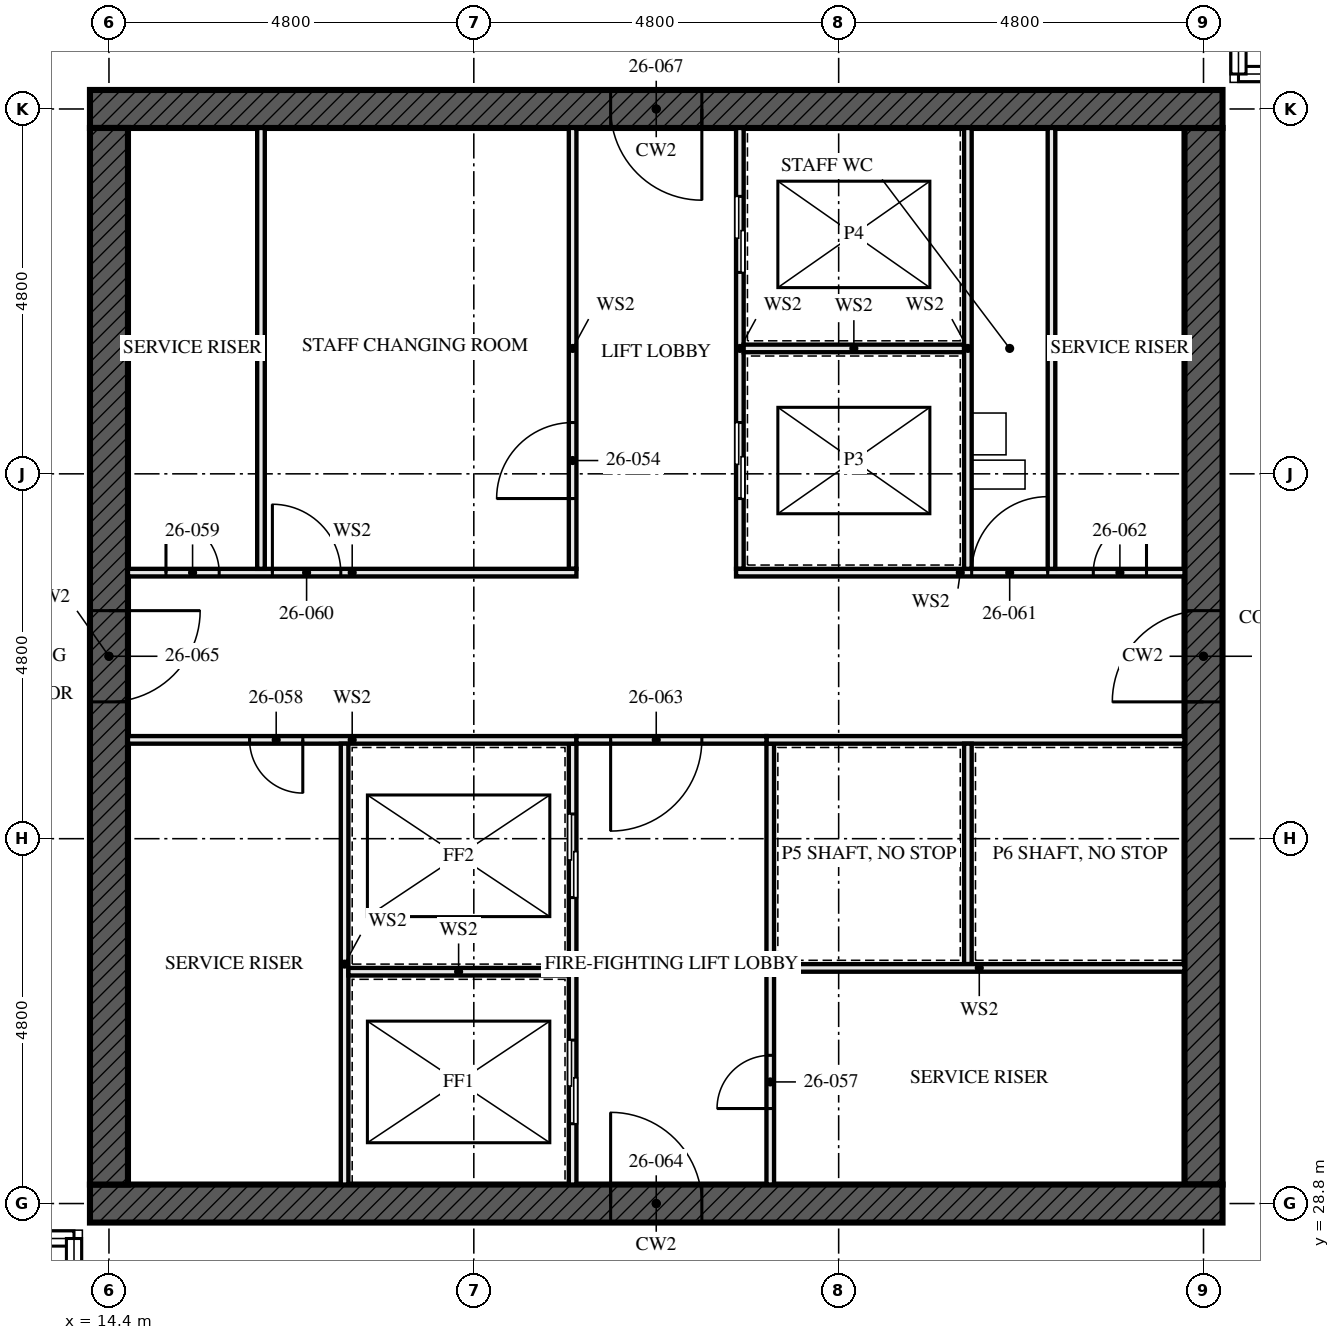
"""IFC4 building model, lengths in metres.
Left out: names, types, materials, properties, quantities, classifications, styles, units other than length and angle.
Written with IfcOpenShell. Run it as: python <this file> out.ifc"""

import sys

from ifc_helpers import new_model, si_unit, direction, frame, frame_2d, origin, place, context, subcontext, project, spatial, rectangle, extrude, element, fill, save


model = new_model("IFC4")
c1 = context("Model", 3, precision=1e-05, world=origin(), true_north=direction((0.0, 1.0)))
c2 = subcontext(c1, "Body", "Model", "MODEL_VIEW")
j1 = project(units=[si_unit("LENGTHUNIT", "METRE"), si_unit("PLANEANGLEUNIT", "RADIAN")], contexts=[c1])
p1 = place(None, origin())
s1 = spatial("IfcSite", under=j1, at=p1, CompositionType="ELEMENT")
p2 = place(p1, origin())
s2 = spatial("IfcBuilding", under=s1, at=p2, CompositionType="ELEMENT")
p3 = place(p2, frame((0.0, 0.0, 98.0)))
s3 = spatial("IfcBuildingStorey", under=s2, at=p3, CompositionType="ELEMENT", Elevation=98.0)
p4 = place(p3, frame((14.15, 28.8, -0.17), z_axis=(0.0, 0.0, 1.0), x_axis=(1.0, 0.0, 0.0)))
e1 = element("IfcWall", 1, at=p4, inside=s3, PredefinedType="SHEAR", context=c2, shape_type="SweptSolid", body=[
    extrude(rectangle(XDim=14.9, YDim=0.5, at=frame_2d((7.45, 0.0))), origin(), (0.0, 0.0, 1.0), 3.5),
])
p5 = place(p4, frame((6.85, 0.0, 0.17)))
e2 = element("IfcOpeningElement", 2, at=p5, cuts=e1, PredefinedType="OPENING", context=c2, shape_type="SweptSolid", body=[
    extrude(rectangle(XDim=1.2, YDim=2.1, at=frame_2d((0.6, 1.05))), frame((0.0, 0.26, 0.0), z_axis=(0.0, -1.0, 0.0), x_axis=(1.0, 0.0, 0.0)), (0.0, 0.0, 1.0), 0.521),
])
p6 = place(p3, frame((29.05, 43.2, -0.17), z_axis=(0.0, 0.0, 1.0), x_axis=(-1.0, 0.0, 0.0)))
e3 = element("IfcWall", 3, at=p6, inside=s3, PredefinedType="SHEAR", context=c2, shape_type="SweptSolid", body=[
    extrude(rectangle(XDim=14.9, YDim=0.5, at=frame_2d((7.45, 0.0))), origin(), (0.0, 0.0, 1.0), 3.5),
])
p7 = place(p6, frame((6.85, 0.0, 0.17)))
e4 = element("IfcOpeningElement", 4, at=p7, cuts=e3, PredefinedType="OPENING", context=c2, shape_type="SweptSolid", body=[
    extrude(rectangle(XDim=1.2, YDim=2.1, at=frame_2d((0.6, 1.05))), frame((0.0, 0.26, 0.0), z_axis=(0.0, -1.0, 0.0), x_axis=(1.0, 0.0, 0.0)), (0.0, 0.0, 1.0), 0.521),
])
p8 = place(p3, frame((14.4, 42.95, -0.17), z_axis=(0.0, 0.0, 1.0), x_axis=(0.0, -1.0, 0.0)))
e5 = element("IfcWall", 5, at=p8, inside=s3, PredefinedType="SHEAR", context=c2, shape_type="SweptSolid", body=[
    extrude(rectangle(XDim=13.9, YDim=0.5, at=frame_2d((6.95, 0.0))), origin(), (0.0, 0.0, 1.0), 3.5),
])
p9 = place(p8, frame((6.35, 0.0, 0.17)))
e6 = element("IfcOpeningElement", 6, at=p9, cuts=e5, PredefinedType="OPENING", context=c2, shape_type="SweptSolid", body=[
    extrude(rectangle(XDim=1.2, YDim=2.1, at=frame_2d((0.6, 1.05))), frame((0.0, 0.26, 0.0), z_axis=(0.0, -1.0, 0.0), x_axis=(1.0, 0.0, 0.0)), (0.0, 0.0, 1.0), 0.521),
])
p10 = place(p3, frame((28.8, 29.05, -0.17), z_axis=(0.0, 0.0, 1.0), x_axis=(0.0, 1.0, 0.0)))
e7 = element("IfcWall", 7, at=p10, inside=s3, PredefinedType="SHEAR", context=c2, shape_type="SweptSolid", body=[
    extrude(rectangle(XDim=13.9, YDim=0.5, at=frame_2d((6.95, 0.0))), origin(), (0.0, 0.0, 1.0), 3.5),
])
p11 = place(p10, frame((6.35, 0.0, 0.17)))
e8 = element("IfcOpeningElement", 8, at=p11, cuts=e7, PredefinedType="OPENING", context=c2, shape_type="SweptSolid", body=[
    extrude(rectangle(XDim=1.2, YDim=2.1, at=frame_2d((0.6, 1.05))), frame((0.0, 0.26, 0.0), z_axis=(0.0, -1.0, 0.0), x_axis=(1.0, 0.0, 0.0)), (0.0, 0.0, 1.0), 0.521),
])
for number, where, z_axis, x_axis in (
    (9, (16.4, 37.15, 0.0), (0.0, 0.0, 1.0), (0.0, 1.0, 0.0)),
    (10, (26.8, 37.15, 0.0), (0.0, 0.0, 1.0), (0.0, 1.0, 0.0)),
):
    element("IfcWall", number, at=place(p3, frame(where, z_axis=z_axis, x_axis=x_axis)), inside=s3, PredefinedType="SOLIDWALL", context=c2, shape_type="SweptSolid", body=[
        extrude(rectangle(XDim=5.8, YDim=0.1, at=frame_2d((2.9, 0.0))), origin(), (0.0, 0.0, 1.0), 3.33),
    ])
p12 = place(p3, frame((20.5, 29.05, 0.0), z_axis=(0.0, 0.0, 1.0), x_axis=(0.0, 1.0, 0.0)))
e11 = element("IfcWall", 11, at=p12, inside=s3, PredefinedType="SOLIDWALL", context=c2, shape_type="SweptSolid", body=[
    extrude(rectangle(XDim=5.8, YDim=0.1, at=frame_2d((2.9, 0.0))), origin(), (0.0, 0.0, 1.0), 3.33),
])
p13 = place(p12, frame((0.8, 0.0, 0.0)))
e12 = element("IfcOpeningElement", 12, at=p13, cuts=e11, PredefinedType="OPENING", context=c2, shape_type="SweptSolid", body=[
    extrude(rectangle(XDim=1.1, YDim=2.3, at=frame_2d((0.55, 1.15))), frame((0.0, 0.061, 0.0), z_axis=(0.0, -1.0, 0.0), x_axis=(1.0, 0.0, 0.0)), (0.0, 0.0, 1.0), 0.121),
])
p14 = place(p12, frame((3.775, 0.0, 0.0)))
e13 = element("IfcOpeningElement", 13, at=p14, cuts=e11, PredefinedType="OPENING", context=c2, shape_type="SweptSolid", body=[
    extrude(rectangle(XDim=1.1, YDim=2.3, at=frame_2d((0.55, 1.15))), frame((0.0, 0.061, 0.0), z_axis=(0.0, -1.0, 0.0), x_axis=(1.0, 0.0, 0.0)), (0.0, 0.0, 1.0), 0.121),
])
p15 = place(p3, frame((20.5, 37.15, 0.0), z_axis=(0.0, 0.0, 1.0), x_axis=(0.0, 1.0, 0.0)))
e14 = element("IfcWall", 14, at=p15, inside=s3, PredefinedType="SOLIDWALL", context=c2, shape_type="SweptSolid", body=[
    extrude(rectangle(XDim=5.8, YDim=0.1, at=frame_2d((2.9, 0.0))), origin(), (0.0, 0.0, 1.0), 3.33),
])
p16 = place(p15, frame((0.925, 0.0, 0.0)))
e15 = element("IfcOpeningElement", 15, at=p16, cuts=e14, PredefinedType="OPENING", context=c2, shape_type="SweptSolid", body=[
    extrude(rectangle(XDim=1.0, YDim=2.1, at=frame_2d((0.5, 1.05))), frame((0.0, 0.061, 0.0), z_axis=(0.0, -1.0, 0.0), x_axis=(1.0, 0.0, 0.0)), (0.0, 0.0, 1.0), 0.121),
])
p17 = place(p3, frame((22.7, 37.15, 0.0), z_axis=(0.0, 0.0, 1.0), x_axis=(0.0, 1.0, 0.0)))
e16 = element("IfcWall", 16, at=p17, inside=s3, PredefinedType="SOLIDWALL", context=c2, shape_type="SweptSolid", body=[
    extrude(rectangle(XDim=5.8, YDim=0.1, at=frame_2d((2.9, 0.0))), origin(), (0.0, 0.0, 1.0), 3.33),
])
p18 = place(p17, frame((0.925, 0.0, 0.0)))
e17 = element("IfcOpeningElement", 17, at=p18, cuts=e16, PredefinedType="OPENING", context=c2, shape_type="SweptSolid", body=[
    extrude(rectangle(XDim=1.0, YDim=2.1, at=frame_2d((0.5, 1.05))), frame((0.0, 0.061, 0.0), z_axis=(0.0, -1.0, 0.0), x_axis=(1.0, 0.0, 0.0)), (0.0, 0.0, 1.0), 0.121),
])
p19 = place(p17, frame((3.9, 0.0, 0.0)))
e18 = element("IfcOpeningElement", 18, at=p19, cuts=e16, PredefinedType="OPENING", context=c2, shape_type="SweptSolid", body=[
    extrude(rectangle(XDim=1.0, YDim=2.1, at=frame_2d((0.5, 1.05))), frame((0.0, 0.061, 0.0), z_axis=(0.0, -1.0, 0.0), x_axis=(1.0, 0.0, 0.0)), (0.0, 0.0, 1.0), 0.121),
])
p20 = place(p3, frame((23.1, 29.05, 0.0), z_axis=(0.0, 0.0, 1.0), x_axis=(0.0, 1.0, 0.0)))
e19 = element("IfcWall", 19, at=p20, inside=s3, PredefinedType="SOLIDWALL", context=c2, shape_type="SweptSolid", body=[
    extrude(rectangle(XDim=5.8, YDim=0.1, at=frame_2d((2.9, 0.0))), origin(), (0.0, 0.0, 1.0), 3.33),
])
p21 = place(p20, frame((1.0, 0.0, 0.0)))
e20 = element("IfcOpeningElement", 20, at=p21, cuts=e19, PredefinedType="OPENING", context=c2, shape_type="SweptSolid", body=[
    extrude(rectangle(XDim=0.7, YDim=2.1, at=frame_2d((0.35, 1.05))), frame((0.0, 0.061, 0.0), z_axis=(0.0, -1.0, 0.0), x_axis=(1.0, 0.0, 0.0)), (0.0, 0.0, 1.0), 0.121),
])
p22 = place(p3, frame((14.65, 34.9, 0.0), z_axis=(0.0, 0.0, 1.0), x_axis=(1.0, 0.0, 0.0)))
e21 = element("IfcWall", 21, at=p22, inside=s3, PredefinedType="SOLIDWALL", context=c2, shape_type="SweptSolid", body=[
    extrude(rectangle(XDim=5.9, YDim=0.1, at=frame_2d((2.95, 0.0))), origin(), (0.0, 0.0, 1.0), 3.33),
])
p23 = place(p22, frame((1.6, 0.0, 0.0)))
e22 = element("IfcOpeningElement", 22, at=p23, cuts=e21, PredefinedType="OPENING", context=c2, shape_type="SweptSolid", body=[
    extrude(rectangle(XDim=0.7, YDim=2.1, at=frame_2d((0.35, 1.05))), frame((0.0, 0.061, 0.0), z_axis=(0.0, -1.0, 0.0), x_axis=(1.0, 0.0, 0.0)), (0.0, 0.0, 1.0), 0.121),
])
p24 = place(p3, frame((23.05, 34.9, 0.0), z_axis=(0.0, 0.0, 1.0), x_axis=(1.0, 0.0, 0.0)))
e23 = element("IfcWall", 23, at=p24, inside=s3, PredefinedType="SOLIDWALL", context=c2, shape_type="SweptSolid", body=[
    extrude(rectangle(XDim=5.5, YDim=0.1, at=frame_2d((2.75, 0.0))), origin(), (0.0, 0.0, 1.0), 3.33),
])
p25 = place(p3, frame((14.65, 37.1, 0.0), z_axis=(0.0, 0.0, 1.0), x_axis=(1.0, 0.0, 0.0)))
e24 = element("IfcWall", 24, at=p25, inside=s3, PredefinedType="SOLIDWALL", context=c2, shape_type="SweptSolid", body=[
    extrude(rectangle(XDim=5.9, YDim=0.1, at=frame_2d((2.95, 0.0))), origin(), (0.0, 0.0, 1.0), 3.33),
])
p26 = place(p25, frame((0.5, 0.0, 0.0)))
e25 = element("IfcOpeningElement", 25, at=p26, cuts=e24, PredefinedType="OPENING", context=c2, shape_type="SweptSolid", body=[
    extrude(rectangle(XDim=0.7, YDim=2.1, at=frame_2d((0.35, 1.05))), frame((0.0, 0.061, 0.0), z_axis=(0.0, -1.0, 0.0), x_axis=(1.0, 0.0, 0.0)), (0.0, 0.0, 1.0), 0.121),
])
p27 = place(p25, frame((1.9, 0.0, 0.0)))
e26 = element("IfcOpeningElement", 26, at=p27, cuts=e24, PredefinedType="OPENING", context=c2, shape_type="SweptSolid", body=[
    extrude(rectangle(XDim=0.9, YDim=2.1, at=frame_2d((0.45, 1.05))), frame((0.0, 0.061, 0.0), z_axis=(0.0, -1.0, 0.0), x_axis=(1.0, 0.0, 0.0)), (0.0, 0.0, 1.0), 0.121),
])
p28 = place(p3, frame((22.65, 37.1, 0.0), z_axis=(0.0, 0.0, 1.0), x_axis=(1.0, 0.0, 0.0)))
e27 = element("IfcWall", 27, at=p28, inside=s3, PredefinedType="SOLIDWALL", context=c2, shape_type="SweptSolid", body=[
    extrude(rectangle(XDim=5.9, YDim=0.1, at=frame_2d((2.95, 0.0))), origin(), (0.0, 0.0, 1.0), 3.33),
])
p29 = place(p28, frame((3.1, 0.0, 0.0)))
e28 = element("IfcOpeningElement", 28, at=p29, cuts=e27, PredefinedType="OPENING", context=c2, shape_type="SweptSolid", body=[
    extrude(rectangle(XDim=1.0, YDim=2.1, at=frame_2d((0.5, 1.05))), frame((0.0, 0.061, 0.0), z_axis=(0.0, -1.0, 0.0), x_axis=(1.0, 0.0, 0.0)), (0.0, 0.0, 1.0), 0.121),
])
p30 = place(p28, frame((4.7, 0.0, 0.0)))
e29 = element("IfcOpeningElement", 29, at=p30, cuts=e27, PredefinedType="OPENING", context=c2, shape_type="SweptSolid", body=[
    extrude(rectangle(XDim=0.7, YDim=2.1, at=frame_2d((0.35, 1.05))), frame((0.0, 0.061, 0.0), z_axis=(0.0, -1.0, 0.0), x_axis=(1.0, 0.0, 0.0)), (0.0, 0.0, 1.0), 0.121),
])
p31 = place(p3, frame((20.55, 34.9, 0.0), z_axis=(0.0, 0.0, 1.0), x_axis=(1.0, 0.0, 0.0)))
e30 = element("IfcWall", 30, at=p31, inside=s3, PredefinedType="SOLIDWALL", context=c2, shape_type="SweptSolid", body=[
    extrude(rectangle(XDim=2.5, YDim=0.1, at=frame_2d((1.25, 0.0))), origin(), (0.0, 0.0, 1.0), 3.33),
])
p32 = place(p31, frame((0.45, 0.0, 0.0)))
e31 = element("IfcOpeningElement", 31, at=p32, cuts=e30, PredefinedType="OPENING", context=c2, shape_type="SweptSolid", body=[
    extrude(rectangle(XDim=1.2, YDim=2.1, at=frame_2d((0.6, 1.05))), frame((0.0, 0.061, 0.0), z_axis=(0.0, -1.0, 0.0), x_axis=(1.0, 0.0, 0.0)), (0.0, 0.0, 1.0), 0.121),
])
p33 = place(p3, frame((17.5, 29.05, 0.0), z_axis=(0.0, 0.0, 1.0), x_axis=(0.0, 1.0, 0.0)))
e32 = element("IfcWall", 32, at=p33, inside=s3, PredefinedType="SOLIDWALL", context=c2, shape_type="SweptSolid", body=[
    extrude(rectangle(XDim=5.8, YDim=0.1, at=frame_2d((2.9, 0.0))), origin(), (0.0, 0.0, 1.0), 3.33),
])
for number, where, z_axis, x_axis in (
    (33, (17.55, 31.85, 0.0), (0.0, 0.0, 1.0), (1.0, 0.0, 0.0)),
    (34, (22.75, 40.05, 0.0), (0.0, 0.0, 1.0), (1.0, 0.0, 0.0)),
):
    element("IfcWall", number, at=place(p3, frame(where, z_axis=z_axis, x_axis=x_axis)), inside=s3, PredefinedType="SOLIDWALL", context=c2, shape_type="SweptSolid", body=[
        extrude(rectangle(XDim=2.9, YDim=0.1, at=frame_2d((1.45, 0.0))), origin(), (0.0, 0.0, 1.0), 3.33),
    ])
p34 = place(p3, frame((25.7, 37.15, 0.0), z_axis=(0.0, 0.0, 1.0), x_axis=(0.0, 1.0, 0.0)))
e35 = element("IfcWall", 35, at=p34, inside=s3, PredefinedType="SOLIDWALL", context=c2, shape_type="SweptSolid", body=[
    extrude(rectangle(XDim=5.8, YDim=0.1, at=frame_2d((2.9, 0.0))), origin(), (0.0, 0.0, 1.0), 3.33),
])
p35 = place(p3, frame((25.7, 31.95, 0.0), z_axis=(0.0, 0.0, 1.0), x_axis=(0.0, 1.0, 0.0)))
e36 = element("IfcWall", 36, at=p35, inside=s3, PredefinedType="SOLIDWALL", context=c2, shape_type="SweptSolid", body=[
    extrude(rectangle(XDim=2.9, YDim=0.1, at=frame_2d((1.45, 0.0))), origin(), (0.0, 0.0, 1.0), 3.33),
])
p36 = place(p3, frame((23.15, 31.9, 0.0), z_axis=(0.0, 0.0, 1.0), x_axis=(1.0, 0.0, 0.0)))
e37 = element("IfcWall", 37, at=p36, inside=s3, PredefinedType="SOLIDWALL", context=c2, shape_type="SweptSolid", body=[
    extrude(rectangle(XDim=5.4, YDim=0.1, at=frame_2d((2.7, 0.0))), origin(), (0.0, 0.0, 1.0), 3.33),
])
p37 = place(p13, origin())
e38 = element("IfcDoor", 38, at=p37, inside=s3, OperationType="SLIDING_TO_LEFT", PredefinedType="DOOR", context=c2, shape_type="SweptSolid", body=[
    extrude(rectangle(XDim=1.1, YDim=2.3, at=frame_2d((0.55, 1.15))), frame((0.0, 0.05, 0.0), z_axis=(0.0, -1.0, 0.0), x_axis=(1.0, 0.0, 0.0)), (0.0, 0.0, 1.0), 0.1),
])
fill(e12, e38)
p38 = place(p14, origin())
e39 = element("IfcDoor", 39, at=p38, inside=s3, OperationType="SLIDING_TO_LEFT", PredefinedType="DOOR", context=c2, shape_type="SweptSolid", body=[
    extrude(rectangle(XDim=1.1, YDim=2.3, at=frame_2d((0.55, 1.15))), frame((0.0, 0.05, 0.0), z_axis=(0.0, -1.0, 0.0), x_axis=(1.0, 0.0, 0.0)), (0.0, 0.0, 1.0), 0.1),
])
fill(e13, e39)
p39 = place(p16, origin())
e40 = element("IfcDoor", 40, at=p39, inside=s3, OperationType="SINGLE_SWING_RIGHT", PredefinedType="DOOR", context=c2, shape_type="SweptSolid", body=[
    extrude(rectangle(XDim=1.0, YDim=2.1, at=frame_2d((0.5, 1.05))), frame((0.0, 0.027, 0.0), z_axis=(0.0, -1.0, 0.0), x_axis=(1.0, 0.0, 0.0)), (0.0, 0.0, 1.0), 0.054),
])
fill(e15, e40)
p40 = place(p18, origin())
e41 = element("IfcDoor", 41, at=p40, inside=s3, OperationType="SLIDING_TO_LEFT", PredefinedType="DOOR", context=c2, shape_type="SweptSolid", body=[
    extrude(rectangle(XDim=1.0, YDim=2.1, at=frame_2d((0.5, 1.05))), frame((0.0, 0.05, 0.0), z_axis=(0.0, -1.0, 0.0), x_axis=(1.0, 0.0, 0.0)), (0.0, 0.0, 1.0), 0.1),
])
fill(e17, e41)
p41 = place(p19, origin())
e42 = element("IfcDoor", 42, at=p41, inside=s3, OperationType="SLIDING_TO_LEFT", PredefinedType="DOOR", context=c2, shape_type="SweptSolid", body=[
    extrude(rectangle(XDim=1.0, YDim=2.1, at=frame_2d((0.5, 1.05))), frame((0.0, 0.05, 0.0), z_axis=(0.0, -1.0, 0.0), x_axis=(1.0, 0.0, 0.0)), (0.0, 0.0, 1.0), 0.1),
])
fill(e18, e42)
p42 = place(p21, origin())
e43 = element("IfcDoor", 43, at=p42, inside=s3, OperationType="SINGLE_SWING_RIGHT", PredefinedType="DOOR", context=c2, shape_type="SweptSolid", body=[
    extrude(rectangle(XDim=0.7, YDim=2.1, at=frame_2d((0.35, 1.05))), frame((0.0, 0.027, 0.0), z_axis=(0.0, -1.0, 0.0), x_axis=(1.0, 0.0, 0.0)), (0.0, 0.0, 1.0), 0.054),
])
fill(e20, e43)
p43 = place(p23, frame((0.7, 0.0, 0.0), z_axis=(0.0, 0.0, 1.0), x_axis=(-1.0, 0.0, 0.0)))
e44 = element("IfcDoor", 44, at=p43, inside=s3, OperationType="SINGLE_SWING_RIGHT", PredefinedType="DOOR", context=c2, shape_type="SweptSolid", body=[
    extrude(rectangle(XDim=0.7, YDim=2.1, at=frame_2d((0.35, 1.05))), frame((0.0, 0.027, 0.0), z_axis=(0.0, -1.0, 0.0), x_axis=(1.0, 0.0, 0.0)), (0.0, 0.0, 1.0), 0.054),
])
fill(e22, e44)
p44 = place(p26, origin())
e45 = element("IfcDoor", 45, at=p44, inside=s3, OperationType="SINGLE_SWING_RIGHT", PredefinedType="DOOR", context=c2, shape_type="SweptSolid", body=[
    extrude(rectangle(XDim=0.7, YDim=2.1, at=frame_2d((0.35, 1.05))), frame((0.0, 0.027, 0.0), z_axis=(0.0, -1.0, 0.0), x_axis=(1.0, 0.0, 0.0)), (0.0, 0.0, 1.0), 0.054),
])
fill(e25, e45)
p45 = place(p27, origin())
e46 = element("IfcDoor", 46, at=p45, inside=s3, OperationType="SINGLE_SWING_RIGHT", PredefinedType="DOOR", context=c2, shape_type="SweptSolid", body=[
    extrude(rectangle(XDim=0.9, YDim=2.1, at=frame_2d((0.45, 1.05))), frame((0.0, 0.027, 0.0), z_axis=(0.0, -1.0, 0.0), x_axis=(1.0, 0.0, 0.0)), (0.0, 0.0, 1.0), 0.054),
])
fill(e26, e46)
p46 = place(p29, origin())
e47 = element("IfcDoor", 47, at=p46, inside=s3, OperationType="SINGLE_SWING_LEFT", PredefinedType="DOOR", context=c2, shape_type="SweptSolid", body=[
    extrude(rectangle(XDim=1.0, YDim=2.1, at=frame_2d((0.5, 1.05))), frame((0.0, 0.027, 0.0), z_axis=(0.0, -1.0, 0.0), x_axis=(1.0, 0.0, 0.0)), (0.0, 0.0, 1.0), 0.054),
])
fill(e28, e47)
p47 = place(p30, origin())
e48 = element("IfcDoor", 48, at=p47, inside=s3, OperationType="SINGLE_SWING_LEFT", PredefinedType="DOOR", context=c2, shape_type="SweptSolid", body=[
    extrude(rectangle(XDim=0.7, YDim=2.1, at=frame_2d((0.35, 1.05))), frame((0.0, 0.027, 0.0), z_axis=(0.0, -1.0, 0.0), x_axis=(1.0, 0.0, 0.0)), (0.0, 0.0, 1.0), 0.054),
])
fill(e29, e48)
p48 = place(p32, frame((1.2, 0.0, 0.0), z_axis=(0.0, 0.0, 1.0), x_axis=(-1.0, 0.0, 0.0)))
e49 = element("IfcDoor", 49, at=p48, inside=s3, OperationType="SINGLE_SWING_LEFT", PredefinedType="DOOR", context=c2, shape_type="SweptSolid", body=[
    extrude(rectangle(XDim=1.2, YDim=2.1, at=frame_2d((0.6, 1.05))), frame((0.0, 0.027, 0.0), z_axis=(0.0, -1.0, 0.0), x_axis=(1.0, 0.0, 0.0)), (0.0, 0.0, 1.0), 0.054),
])
fill(e31, e49)
p49 = place(p5, origin())
e50 = element("IfcDoor", 50, at=p49, inside=s3, OperationType="SINGLE_SWING_LEFT", PredefinedType="DOOR", context=c2, shape_type="SweptSolid", body=[
    extrude(rectangle(XDim=1.2, YDim=2.1, at=frame_2d((0.6, 1.05))), frame((0.0, 0.027, 0.0), z_axis=(0.0, -1.0, 0.0), x_axis=(1.0, 0.0, 0.0)), (0.0, 0.0, 1.0), 0.054),
])
fill(e2, e50)
p50 = place(p9, origin())
e51 = element("IfcDoor", 51, at=p50, inside=s3, OperationType="SINGLE_SWING_LEFT", PredefinedType="DOOR", context=c2, shape_type="SweptSolid", body=[
    extrude(rectangle(XDim=1.2, YDim=2.1, at=frame_2d((0.6, 1.05))), frame((0.0, 0.027, 0.0), z_axis=(0.0, -1.0, 0.0), x_axis=(1.0, 0.0, 0.0)), (0.0, 0.0, 1.0), 0.054),
])
fill(e6, e51)
p51 = place(p11, origin())
e52 = element("IfcDoor", 52, at=p51, inside=s3, OperationType="SINGLE_SWING_LEFT", PredefinedType="DOOR", context=c2, shape_type="SweptSolid", body=[
    extrude(rectangle(XDim=1.2, YDim=2.1, at=frame_2d((0.6, 1.05))), frame((0.0, 0.027, 0.0), z_axis=(0.0, -1.0, 0.0), x_axis=(1.0, 0.0, 0.0)), (0.0, 0.0, 1.0), 0.054),
])
fill(e8, e52)
p52 = place(p7, origin())
e53 = element("IfcDoor", 53, at=p52, inside=s3, OperationType="SINGLE_SWING_LEFT", PredefinedType="DOOR", context=c2, shape_type="SweptSolid", body=[
    extrude(rectangle(XDim=1.2, YDim=2.1, at=frame_2d((0.6, 1.05))), frame((0.0, 0.027, 0.0), z_axis=(0.0, -1.0, 0.0), x_axis=(1.0, 0.0, 0.0)), (0.0, 0.0, 1.0), 0.054),
])
fill(e4, e53)
save(model, sys.argv[1])
